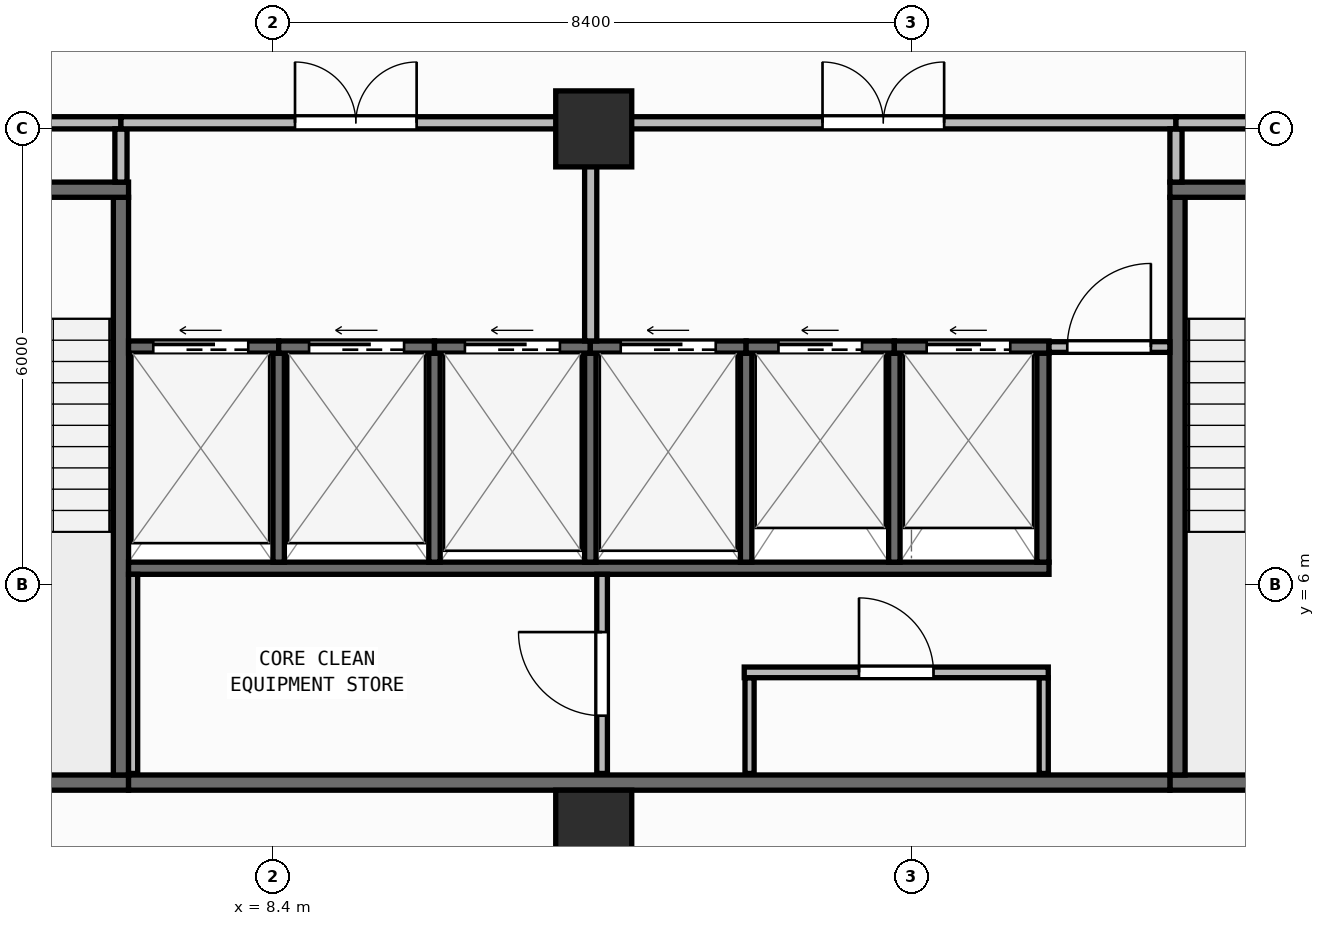
"""IFC4 building model, lengths in metres.
Left out: names, types, materials, properties, quantities, classifications, styles, units other than length and angle.
Written with IfcOpenShell. Run it as: python <this file> out.ifc"""

import sys

from ifc_helpers import new_model, si_unit, direction, frame, frame_2d, origin, origin_2d, place, context, subcontext, project, spatial, rectangle, extrude, element, fill, save


model = new_model("IFC4")
c1 = context("Model", 3, precision=1e-05, world=origin(), true_north=direction((0.0, 1.0)))
c2 = subcontext(c1, "Body", "Model", "MODEL_VIEW")
j1 = project(units=[si_unit("LENGTHUNIT", "METRE"), si_unit("PLANEANGLEUNIT", "RADIAN")], contexts=[c1])
p1 = place(None, origin())
s1 = spatial("IfcSite", under=j1, at=p1, CompositionType="ELEMENT")
p2 = place(p1, origin())
s2 = spatial("IfcBuilding", under=s1, at=p2, CompositionType="ELEMENT")
p3 = place(p2, frame((0.0, 0.0, 200.0)))
s3 = spatial("IfcBuildingStorey", under=s2, at=p3, CompositionType="ELEMENT", Elevation=200.0)
for number, where, z_axis, x_axis in (
    (1, (12.62, 2.8, 0.0), (0.0, 0.0, 1.0), (1.0, 0.0, 0.0)),
    (2, (12.62, 12.0, 0.0), (0.0, 0.0, 1.0), (1.0, 0.0, 0.0)),
):
    element("IfcColumn", number, at=place(p3, frame(where, z_axis=z_axis, x_axis=x_axis)), inside=s3, PredefinedType="COLUMN", context=c2, shape_type="SweptSolid", body=[
        extrude(rectangle(XDim=1.0, YDim=1.0, at=origin_2d()), origin(), (0.0, 0.0, 1.0), 3.95),
    ])
p4 = place(p3, frame((2.66, 0.174, 0.0), z_axis=(0.0, 0.0, 1.0), x_axis=(0.996634028439, 0.081979347142, 0.0)))
e3 = element("IfcWall", 3, at=p4, inside=s3, PredefinedType="STANDARD", context=c2, shape_type="SweptSolid", body=[
    extrude(rectangle(XDim=46.035, YDim=0.26, at=frame_2d((23.018, 0.0))), origin(), (0.0, 0.0, 1.0), 3.71),
])
p5 = place(p4, frame((21.817, 0.0, 0.9)))
e4 = element("IfcOpeningElement", 4, at=p5, cuts=e3, PredefinedType="OPENING", context=c2, shape_type="SweptSolid", body=[
    extrude(rectangle(XDim=2.4, YDim=1.65, at=frame_2d((1.2, 0.825))), frame((0.0, 0.14, 0.0), z_axis=(0.0, -1.0, 0.0), x_axis=(1.0, 0.0, 0.0)), (0.0, 0.0, 1.0), 0.28),
])
p6 = place(p3, frame((2.8, 3.4, 0.0), z_axis=(0.0, 0.0, 1.0), x_axis=(1.0, 0.0, 0.0)))
e5 = element("IfcWall", 5, at=p6, inside=s3, PredefinedType="SHEAR", context=c2, shape_type="SweptSolid", body=[
    extrude(rectangle(XDim=3.7, YDim=0.2, at=frame_2d((1.85, 0.0))), origin(), (0.0, 0.0, 1.0), 3.71),
])
p7 = place(p3, frame((6.4, 3.5, 0.0), z_axis=(0.0, 0.0, 1.0), x_axis=(0.0, 1.0, 0.0)))
e6 = element("IfcWall", 6, at=p7, inside=s3, PredefinedType="SHEAR", context=c2, shape_type="SweptSolid", body=[
    extrude(rectangle(XDim=7.6, YDim=0.2, at=frame_2d((3.8, 0.0))), origin(), (0.0, 0.0, 1.0), 3.71),
])
p8 = place(p3, frame((2.8, 11.2, 0.0), z_axis=(0.0, 0.0, 1.0), x_axis=(1.0, 0.0, 0.0)))
e7 = element("IfcWall", 7, at=p8, inside=s3, PredefinedType="SHEAR", context=c2, shape_type="SweptSolid", body=[
    extrude(rectangle(XDim=3.7, YDim=0.2, at=frame_2d((1.85, 0.0))), origin(), (0.0, 0.0, 1.0), 3.71),
])
p9 = place(p8, frame((1.2, 0.0, 0.0)))
e8 = element("IfcOpeningElement", 8, at=p9, cuts=e7, PredefinedType="OPENING", context=c2, shape_type="SweptSolid", body=[
    extrude(rectangle(XDim=1.3, YDim=2.15, at=frame_2d((0.65, 1.075))), frame((0.0, 0.11, 0.0), z_axis=(0.0, -1.0, 0.0), x_axis=(1.0, 0.0, 0.0)), (0.0, 0.0, 1.0), 0.22),
])
p10 = place(p3, frame((20.2, 3.4, 0.0), z_axis=(0.0, 0.0, 1.0), x_axis=(1.0, 0.0, 0.0)))
e9 = element("IfcWall", 9, at=p10, inside=s3, PredefinedType="SHEAR", context=c2, shape_type="SweptSolid", body=[
    extrude(rectangle(XDim=3.7, YDim=0.2, at=frame_2d((1.85, 0.0))), origin(), (0.0, 0.0, 1.0), 3.71),
])
p11 = place(p3, frame((20.3, 3.5, 0.0), z_axis=(0.0, 0.0, 1.0), x_axis=(0.0, 1.0, 0.0)))
e10 = element("IfcWall", 10, at=p11, inside=s3, PredefinedType="SHEAR", context=c2, shape_type="SweptSolid", body=[
    extrude(rectangle(XDim=7.6, YDim=0.2, at=frame_2d((3.8, 0.0))), origin(), (0.0, 0.0, 1.0), 3.71),
])
p12 = place(p3, frame((20.2, 11.2, 0.0), z_axis=(0.0, 0.0, 1.0), x_axis=(1.0, 0.0, 0.0)))
e11 = element("IfcWall", 11, at=p12, inside=s3, PredefinedType="SHEAR", context=c2, shape_type="SweptSolid", body=[
    extrude(rectangle(XDim=3.7, YDim=0.2, at=frame_2d((1.85, 0.0))), origin(), (0.0, 0.0, 1.0), 3.71),
])
p13 = place(p12, frame((1.2, 0.0, 0.0)))
e12 = element("IfcOpeningElement", 12, at=p13, cuts=e11, PredefinedType="OPENING", context=c2, shape_type="SweptSolid", body=[
    extrude(rectangle(XDim=1.3, YDim=2.15, at=frame_2d((0.65, 1.075))), frame((0.0, 0.11, 0.0), z_axis=(0.0, -1.0, 0.0), x_axis=(1.0, 0.0, 0.0)), (0.0, 0.0, 1.0), 0.22),
])
p14 = place(p3, frame((6.5, 3.4, 0.0), z_axis=(0.0, 0.0, 1.0), x_axis=(1.0, 0.0, 0.0)))
e13 = element("IfcWall", 13, at=p14, inside=s3, PredefinedType="SHEAR", context=c2, shape_type="SweptSolid", body=[
    extrude(rectangle(XDim=13.7, YDim=0.2, at=frame_2d((6.85, 0.0))), origin(), (0.0, 0.0, 1.0), 3.71),
])
p15 = place(p3, frame((6.5, 6.22, 0.0), z_axis=(0.0, 0.0, 1.0), x_axis=(1.0, 0.0, 0.0)))
e14 = element("IfcWall", 14, at=p15, inside=s3, PredefinedType="SHEAR", context=c2, shape_type="SweptSolid", body=[
    extrude(rectangle(XDim=12.11, YDim=0.16, at=frame_2d((6.055, 0.0))), origin(), (0.0, 0.0, 1.0), 3.71),
])
p16 = place(p3, frame((18.53, 6.3, 0.0), z_axis=(0.0, 0.0, 1.0), x_axis=(0.0, 1.0, 0.0)))
e15 = element("IfcWall", 15, at=p16, inside=s3, PredefinedType="SHEAR", context=c2, shape_type="SweptSolid", body=[
    extrude(rectangle(XDim=2.75, YDim=0.16, at=frame_2d((1.375, 0.0))), origin(), (0.0, 0.0, 1.0), 3.71),
])
for number, where, z_axis, x_axis in (
    (16, (8.475, 6.3, 0.0), (0.0, 0.0, 1.0), (0.0, 1.0, 0.0)),
    (17, (10.525, 6.3, 0.0), (0.0, 0.0, 1.0), (0.0, 1.0, 0.0)),
    (18, (12.575, 6.3, 0.0), (0.0, 0.0, 1.0), (0.0, 1.0, 0.0)),
    (19, (14.625, 6.3, 0.0), (0.0, 0.0, 1.0), (0.0, 1.0, 0.0)),
    (20, (16.575, 6.3, 0.0), (0.0, 0.0, 1.0), (0.0, 1.0, 0.0)),
):
    element("IfcWall", number, at=place(p3, frame(where, z_axis=z_axis, x_axis=x_axis)), inside=s3, PredefinedType="SHEAR", context=c2, shape_type="SweptSolid", body=[
        extrude(rectangle(XDim=2.75, YDim=0.15, at=frame_2d((1.375, 0.0))), origin(), (0.0, 0.0, 1.0), 3.71),
    ])
p17 = place(p3, frame((6.5, 9.13, 0.0), z_axis=(0.0, 0.0, 1.0), x_axis=(1.0, 0.0, 0.0)))
e21 = element("IfcWall", 21, at=p17, inside=s3, PredefinedType="SHEAR", context=c2, shape_type="SweptSolid", body=[
    extrude(rectangle(XDim=1.975, YDim=0.16, at=frame_2d((0.988, 0.0))), origin(), (0.0, 0.0, 1.0), 3.71),
])
p18 = place(p17, frame((0.325, 0.0, 0.0)))
e22 = element("IfcOpeningElement", 22, at=p18, cuts=e21, PredefinedType="OPENING", context=c2, shape_type="SweptSolid", body=[
    extrude(rectangle(XDim=1.25, YDim=2.15, at=frame_2d((0.625, 1.075))), frame((0.0, 0.09, 0.0), z_axis=(0.0, -1.0, 0.0), x_axis=(1.0, 0.0, 0.0)), (0.0, 0.0, 1.0), 0.18),
])
p19 = place(p3, frame((8.475, 9.13, 0.0), z_axis=(0.0, 0.0, 1.0), x_axis=(1.0, 0.0, 0.0)))
e23 = element("IfcWall", 23, at=p19, inside=s3, PredefinedType="SHEAR", context=c2, shape_type="SweptSolid", body=[
    extrude(rectangle(XDim=2.05, YDim=0.16, at=frame_2d((1.025, 0.0))), origin(), (0.0, 0.0, 1.0), 3.71),
])
p20 = place(p19, frame((0.4, 0.0, 0.0)))
e24 = element("IfcOpeningElement", 24, at=p20, cuts=e23, PredefinedType="OPENING", context=c2, shape_type="SweptSolid", body=[
    extrude(rectangle(XDim=1.25, YDim=2.15, at=frame_2d((0.625, 1.075))), frame((0.0, 0.09, 0.0), z_axis=(0.0, -1.0, 0.0), x_axis=(1.0, 0.0, 0.0)), (0.0, 0.0, 1.0), 0.18),
])
p21 = place(p3, frame((10.525, 9.13, 0.0), z_axis=(0.0, 0.0, 1.0), x_axis=(1.0, 0.0, 0.0)))
e25 = element("IfcWall", 25, at=p21, inside=s3, PredefinedType="SHEAR", context=c2, shape_type="SweptSolid", body=[
    extrude(rectangle(XDim=2.05, YDim=0.16, at=frame_2d((1.025, 0.0))), origin(), (0.0, 0.0, 1.0), 3.71),
])
p22 = place(p21, frame((0.4, 0.0, 0.0)))
e26 = element("IfcOpeningElement", 26, at=p22, cuts=e25, PredefinedType="OPENING", context=c2, shape_type="SweptSolid", body=[
    extrude(rectangle(XDim=1.25, YDim=2.15, at=frame_2d((0.625, 1.075))), frame((0.0, 0.09, 0.0), z_axis=(0.0, -1.0, 0.0), x_axis=(1.0, 0.0, 0.0)), (0.0, 0.0, 1.0), 0.18),
])
p23 = place(p3, frame((12.575, 9.13, 0.0), z_axis=(0.0, 0.0, 1.0), x_axis=(1.0, 0.0, 0.0)))
e27 = element("IfcWall", 27, at=p23, inside=s3, PredefinedType="SHEAR", context=c2, shape_type="SweptSolid", body=[
    extrude(rectangle(XDim=2.05, YDim=0.16, at=frame_2d((1.025, 0.0))), origin(), (0.0, 0.0, 1.0), 3.71),
])
p24 = place(p23, frame((0.4, 0.0, 0.0)))
e28 = element("IfcOpeningElement", 28, at=p24, cuts=e27, PredefinedType="OPENING", context=c2, shape_type="SweptSolid", body=[
    extrude(rectangle(XDim=1.25, YDim=2.15, at=frame_2d((0.625, 1.075))), frame((0.0, 0.09, 0.0), z_axis=(0.0, -1.0, 0.0), x_axis=(1.0, 0.0, 0.0)), (0.0, 0.0, 1.0), 0.18),
])
p25 = place(p3, frame((14.625, 9.13, 0.0), z_axis=(0.0, 0.0, 1.0), x_axis=(1.0, 0.0, 0.0)))
e29 = element("IfcWall", 29, at=p25, inside=s3, PredefinedType="SHEAR", context=c2, shape_type="SweptSolid", body=[
    extrude(rectangle(XDim=1.95, YDim=0.16, at=frame_2d((0.975, 0.0))), origin(), (0.0, 0.0, 1.0), 3.71),
])
p26 = place(p25, frame((0.425, 0.0, 0.0)))
e30 = element("IfcOpeningElement", 30, at=p26, cuts=e29, PredefinedType="OPENING", context=c2, shape_type="SweptSolid", body=[
    extrude(rectangle(XDim=1.1, YDim=2.15, at=frame_2d((0.55, 1.075))), frame((0.0, 0.09, 0.0), z_axis=(0.0, -1.0, 0.0), x_axis=(1.0, 0.0, 0.0)), (0.0, 0.0, 1.0), 0.18),
])
p27 = place(p3, frame((16.575, 9.13, 0.0), z_axis=(0.0, 0.0, 1.0), x_axis=(1.0, 0.0, 0.0)))
e31 = element("IfcWall", 31, at=p27, inside=s3, PredefinedType="SHEAR", context=c2, shape_type="SweptSolid", body=[
    extrude(rectangle(XDim=2.035, YDim=0.16, at=frame_2d((1.018, 0.0))), origin(), (0.0, 0.0, 1.0), 3.71),
])
p28 = place(p27, frame((0.425, 0.0, 0.0)))
e32 = element("IfcOpeningElement", 32, at=p28, cuts=e31, PredefinedType="OPENING", context=c2, shape_type="SweptSolid", body=[
    extrude(rectangle(XDim=1.1, YDim=2.15, at=frame_2d((0.55, 1.075))), frame((0.0, 0.09, 0.0), z_axis=(0.0, -1.0, 0.0), x_axis=(1.0, 0.0, 0.0)), (0.0, 0.0, 1.0), 0.18),
])
p29 = place(p3, frame((6.56, 3.52, 0.0), z_axis=(0.0, 0.0, 1.0), x_axis=(0.0, 1.0, 0.0)))
e33 = element("IfcWall", 33, at=p29, inside=s3, PredefinedType="PARTITIONING", context=c2, shape_type="SweptSolid", body=[
    extrude(rectangle(XDim=2.62, YDim=0.12, at=frame_2d((1.31, 0.0))), origin(), (0.0, 0.0, 1.0), 3.71),
])
p30 = place(p3, frame((12.73, 3.52, 0.0), z_axis=(0.0, 0.0, 1.0), x_axis=(0.0, 1.0, 0.0)))
e34 = element("IfcWall", 34, at=p30, inside=s3, PredefinedType="PARTITIONING", context=c2, shape_type="SweptSolid", body=[
    extrude(rectangle(XDim=2.62, YDim=0.14, at=frame_2d((1.31, 0.0))), origin(), (0.0, 0.0, 1.0), 3.71),
])
p31 = place(p30, frame((0.76, 0.0, 0.0)))
e35 = element("IfcOpeningElement", 35, at=p31, cuts=e34, PredefinedType="OPENING", context=c2, shape_type="SweptSolid", body=[
    extrude(rectangle(XDim=1.1, YDim=2.1, at=frame_2d((0.55, 1.05))), frame((0.0, 0.08, 0.0), z_axis=(0.0, -1.0, 0.0), x_axis=(1.0, 0.0, 0.0)), (0.0, 0.0, 1.0), 0.16),
])
for number, where, z_axis, x_axis in (
    (36, (14.67, 3.52, 0.0), (0.0, 0.0, 1.0), (0.0, 1.0, 0.0)),
    (37, (18.54, 3.52, 0.0), (0.0, 0.0, 1.0), (0.0, 1.0, 0.0)),
):
    element("IfcWall", number, at=place(p3, frame(where, z_axis=z_axis, x_axis=x_axis)), inside=s3, PredefinedType="PARTITIONING", context=c2, shape_type="SweptSolid", body=[
        extrude(rectangle(XDim=1.26, YDim=0.12, at=frame_2d((0.63, 0.0))), origin(), (0.0, 0.0, 1.0), 3.71),
    ])
p32 = place(p3, frame((14.6, 4.85, 0.0), z_axis=(0.0, 0.0, 1.0), x_axis=(1.0, 0.0, 0.0)))
e38 = element("IfcWall", 38, at=p32, inside=s3, PredefinedType="PARTITIONING", context=c2, shape_type="SweptSolid", body=[
    extrude(rectangle(XDim=4.0, YDim=0.14, at=frame_2d((2.0, 0.0))), origin(), (0.0, 0.0, 1.0), 3.71),
])
p33 = place(p32, frame((1.51, 0.0, 0.0)))
e39 = element("IfcOpeningElement", 39, at=p33, cuts=e38, PredefinedType="OPENING", context=c2, shape_type="SweptSolid", body=[
    extrude(rectangle(XDim=0.98, YDim=2.1, at=frame_2d((0.49, 1.05))), frame((0.0, 0.08, 0.0), z_axis=(0.0, -1.0, 0.0), x_axis=(1.0, 0.0, 0.0)), (0.0, 0.0, 1.0), 0.16),
])
p34 = place(p3, frame((18.61, 9.13, 0.0), z_axis=(0.0, 0.0, 1.0), x_axis=(1.0, 0.0, 0.0)))
e40 = element("IfcWall", 40, at=p34, inside=s3, PredefinedType="PARTITIONING", context=c2, shape_type="SweptSolid", body=[
    extrude(rectangle(XDim=1.59, YDim=0.14, at=frame_2d((0.795, 0.0))), origin(), (0.0, 0.0, 1.0), 3.71),
])
p35 = place(p34, frame((0.24, 0.0, 0.0)))
e41 = element("IfcOpeningElement", 41, at=p35, cuts=e40, PredefinedType="OPENING", context=c2, shape_type="SweptSolid", body=[
    extrude(rectangle(XDim=1.1, YDim=2.1, at=frame_2d((0.55, 1.05))), frame((0.0, 0.08, 0.0), z_axis=(0.0, -1.0, 0.0), x_axis=(1.0, 0.0, 0.0)), (0.0, 0.0, 1.0), 0.16),
])
p36 = place(p3, frame((2.8, 12.08, 0.0), z_axis=(0.0, 0.0, 1.0), x_axis=(1.0, 0.0, 0.0)))
e42 = element("IfcWall", 42, at=p36, inside=s3, PredefinedType="PARTITIONING", context=c2, shape_type="SweptSolid", body=[
    extrude(rectangle(XDim=3.6, YDim=0.16, at=frame_2d((1.8, 0.0))), origin(), (0.0, 0.0, 1.0), 3.152),
])
p37 = place(p36, frame((1.0, 0.0, 0.0)))
e43 = element("IfcOpeningElement", 43, at=p37, cuts=e42, PredefinedType="OPENING", context=c2, shape_type="SweptSolid", body=[
    extrude(rectangle(XDim=1.6, YDim=2.05, at=frame_2d((0.8, 1.025))), frame((0.0, 0.09, 0.0), z_axis=(0.0, -1.0, 0.0), x_axis=(1.0, 0.0, 0.0)), (0.0, 0.0, 1.0), 0.18),
])
p38 = place(p3, frame((6.4, 11.3, 0.0), z_axis=(0.0, 0.0, 1.0), x_axis=(0.0, 1.0, 0.0)))
e44 = element("IfcWall", 44, at=p38, inside=s3, PredefinedType="PARTITIONING", context=c2, shape_type="SweptSolid", body=[
    extrude(rectangle(XDim=0.7, YDim=0.16, at=frame_2d((0.35, 0.0))), origin(), (0.0, 0.0, 1.0), 3.71),
])
p39 = place(p3, frame((6.4, 12.08, 0.0), z_axis=(0.0, 0.0, 1.0), x_axis=(1.0, 0.0, 0.0)))
e45 = element("IfcWall", 45, at=p39, inside=s3, PredefinedType="PARTITIONING", context=c2, shape_type="SweptSolid", body=[
    extrude(rectangle(XDim=6.18, YDim=0.16, at=frame_2d((3.09, 0.0))), origin(), (0.0, 0.0, 1.0), 3.152),
])
p40 = place(p39, frame((2.29, 0.0, 0.0)))
e46 = element("IfcOpeningElement", 46, at=p40, cuts=e45, PredefinedType="OPENING", context=c2, shape_type="SweptSolid", body=[
    extrude(rectangle(XDim=1.6, YDim=2.05, at=frame_2d((0.8, 1.025))), frame((0.0, 0.09, 0.0), z_axis=(0.0, -1.0, 0.0), x_axis=(1.0, 0.0, 0.0)), (0.0, 0.0, 1.0), 0.18),
])
p41 = place(p3, frame((12.58, 9.21, 0.0), z_axis=(0.0, 0.0, 1.0), x_axis=(0.0, 1.0, 0.0)))
e47 = element("IfcWall", 47, at=p41, inside=s3, PredefinedType="PARTITIONING", context=c2, shape_type="SweptSolid", body=[
    extrude(rectangle(XDim=2.79, YDim=0.16, at=frame_2d((1.395, 0.0))), origin(), (0.0, 0.0, 1.0), 3.71),
])
p42 = place(p3, frame((12.58, 12.08, 0.0), z_axis=(0.0, 0.0, 1.0), x_axis=(1.0, 0.0, 0.0)))
e48 = element("IfcWall", 48, at=p42, inside=s3, PredefinedType="PARTITIONING", context=c2, shape_type="SweptSolid", body=[
    extrude(rectangle(XDim=7.7, YDim=0.16, at=frame_2d((3.85, 0.0))), origin(), (0.0, 0.0, 1.0), 3.152),
])
p43 = place(p42, frame((3.05, 0.0, 0.0)))
e49 = element("IfcOpeningElement", 49, at=p43, cuts=e48, PredefinedType="OPENING", context=c2, shape_type="SweptSolid", body=[
    extrude(rectangle(XDim=1.6, YDim=2.05, at=frame_2d((0.8, 1.025))), frame((0.0, 0.09, 0.0), z_axis=(0.0, -1.0, 0.0), x_axis=(1.0, 0.0, 0.0)), (0.0, 0.0, 1.0), 0.18),
])
p44 = place(p3, frame((20.28, 11.3, 0.0), z_axis=(0.0, 0.0, 1.0), x_axis=(0.0, 1.0, 0.0)))
e50 = element("IfcWall", 50, at=p44, inside=s3, PredefinedType="PARTITIONING", context=c2, shape_type="SweptSolid", body=[
    extrude(rectangle(XDim=0.7, YDim=0.16, at=frame_2d((0.35, 0.0))), origin(), (0.0, 0.0, 1.0), 3.71),
])
p45 = place(p3, frame((20.28, 12.08, 0.0), z_axis=(0.0, 0.0, 1.0), x_axis=(1.0, 0.0, 0.0)))
e51 = element("IfcWall", 51, at=p45, inside=s3, PredefinedType="PARTITIONING", context=c2, shape_type="SweptSolid", body=[
    extrude(rectangle(XDim=3.62, YDim=0.16, at=frame_2d((1.81, 0.0))), origin(), (0.0, 0.0, 1.0), 3.152),
])
p46 = place(p45, frame((1.01, 0.0, 0.0)))
e52 = element("IfcOpeningElement", 52, at=p46, cuts=e51, PredefinedType="OPENING", context=c2, shape_type="SweptSolid", body=[
    extrude(rectangle(XDim=1.6, YDim=2.05, at=frame_2d((0.8, 1.025))), frame((0.0, 0.09, 0.0), z_axis=(0.0, -1.0, 0.0), x_axis=(1.0, 0.0, 0.0)), (0.0, 0.0, 1.0), 0.18),
])
p47 = place(p18, origin())
e53 = element("IfcDoor", 53, at=p47, inside=s3, OperationType="SLIDING_TO_LEFT", PredefinedType="DOOR", context=c2, shape_type="SweptSolid", body=[
    extrude(rectangle(XDim=1.25, YDim=2.15, at=frame_2d((0.625, 1.075))), frame((0.0, 0.025, 0.0), z_axis=(0.0, -1.0, 0.0), x_axis=(1.0, 0.0, 0.0)), (0.0, 0.0, 1.0), 0.05),
])
fill(e22, e53)
p48 = place(p20, origin())
e54 = element("IfcDoor", 54, at=p48, inside=s3, OperationType="SLIDING_TO_LEFT", PredefinedType="DOOR", context=c2, shape_type="SweptSolid", body=[
    extrude(rectangle(XDim=1.25, YDim=2.15, at=frame_2d((0.625, 1.075))), frame((0.0, 0.025, 0.0), z_axis=(0.0, -1.0, 0.0), x_axis=(1.0, 0.0, 0.0)), (0.0, 0.0, 1.0), 0.05),
])
fill(e24, e54)
p49 = place(p22, origin())
e55 = element("IfcDoor", 55, at=p49, inside=s3, OperationType="SLIDING_TO_LEFT", PredefinedType="DOOR", context=c2, shape_type="SweptSolid", body=[
    extrude(rectangle(XDim=1.25, YDim=2.15, at=frame_2d((0.625, 1.075))), frame((0.0, 0.025, 0.0), z_axis=(0.0, -1.0, 0.0), x_axis=(1.0, 0.0, 0.0)), (0.0, 0.0, 1.0), 0.05),
])
fill(e26, e55)
p50 = place(p24, origin())
e56 = element("IfcDoor", 56, at=p50, inside=s3, OperationType="SLIDING_TO_LEFT", PredefinedType="DOOR", context=c2, shape_type="SweptSolid", body=[
    extrude(rectangle(XDim=1.25, YDim=2.15, at=frame_2d((0.625, 1.075))), frame((0.0, 0.025, 0.0), z_axis=(0.0, -1.0, 0.0), x_axis=(1.0, 0.0, 0.0)), (0.0, 0.0, 1.0), 0.05),
])
fill(e28, e56)
p51 = place(p26, origin())
e57 = element("IfcDoor", 57, at=p51, inside=s3, OperationType="SLIDING_TO_LEFT", PredefinedType="DOOR", context=c2, shape_type="SweptSolid", body=[
    extrude(rectangle(XDim=1.1, YDim=2.15, at=frame_2d((0.55, 1.075))), frame((0.0, 0.025, 0.0), z_axis=(0.0, -1.0, 0.0), x_axis=(1.0, 0.0, 0.0)), (0.0, 0.0, 1.0), 0.05),
])
fill(e30, e57)
p52 = place(p28, origin())
e58 = element("IfcDoor", 58, at=p52, inside=s3, OperationType="SLIDING_TO_LEFT", PredefinedType="DOOR", context=c2, shape_type="SweptSolid", body=[
    extrude(rectangle(XDim=1.1, YDim=2.15, at=frame_2d((0.55, 1.075))), frame((0.0, 0.025, 0.0), z_axis=(0.0, -1.0, 0.0), x_axis=(1.0, 0.0, 0.0)), (0.0, 0.0, 1.0), 0.05),
])
fill(e32, e58)
p53 = place(p31, origin())
e59 = element("IfcDoor", 59, at=p53, inside=s3, OperationType="SINGLE_SWING_RIGHT", PredefinedType="DOOR", context=c2, shape_type="SweptSolid", body=[
    extrude(rectangle(XDim=1.1, YDim=2.1, at=frame_2d((0.55, 1.05))), frame((0.0, 0.025, 0.0), z_axis=(0.0, -1.0, 0.0), x_axis=(1.0, 0.0, 0.0)), (0.0, 0.0, 1.0), 0.05),
])
fill(e35, e59)
p54 = place(p33, origin())
e60 = element("IfcDoor", 60, at=p54, inside=s3, OperationType="SINGLE_SWING_LEFT", PredefinedType="DOOR", context=c2, shape_type="SweptSolid", body=[
    extrude(rectangle(XDim=0.98, YDim=2.1, at=frame_2d((0.49, 1.05))), frame((0.0, 0.025, 0.0), z_axis=(0.0, -1.0, 0.0), x_axis=(1.0, 0.0, 0.0)), (0.0, 0.0, 1.0), 0.05),
])
fill(e39, e60)
p55 = place(p35, origin())
e61 = element("IfcDoor", 61, at=p55, inside=s3, OperationType="SINGLE_SWING_RIGHT", PredefinedType="DOOR", context=c2, shape_type="SweptSolid", body=[
    extrude(rectangle(XDim=1.1, YDim=2.1, at=frame_2d((0.55, 1.05))), frame((0.0, 0.025, 0.0), z_axis=(0.0, -1.0, 0.0), x_axis=(1.0, 0.0, 0.0)), (0.0, 0.0, 1.0), 0.05),
])
fill(e41, e61)
p56 = place(p40, origin())
e62 = element("IfcDoor", 62, at=p56, inside=s3, OperationType="DOUBLE_DOOR_SINGLE_SWING", PredefinedType="DOOR", context=c2, shape_type="SweptSolid", body=[
    extrude(rectangle(XDim=1.6, YDim=2.05, at=frame_2d((0.8, 1.025))), frame((0.0, 0.025, 0.0), z_axis=(0.0, -1.0, 0.0), x_axis=(1.0, 0.0, 0.0)), (0.0, 0.0, 1.0), 0.05),
])
fill(e46, e62)
p57 = place(p43, origin())
e63 = element("IfcDoor", 63, at=p57, inside=s3, OperationType="DOUBLE_DOOR_SINGLE_SWING", PredefinedType="DOOR", context=c2, shape_type="SweptSolid", body=[
    extrude(rectangle(XDim=1.6, YDim=2.05, at=frame_2d((0.8, 1.025))), frame((0.0, 0.025, 0.0), z_axis=(0.0, -1.0, 0.0), x_axis=(1.0, 0.0, 0.0)), (0.0, 0.0, 1.0), 0.05),
])
fill(e49, e63)
save(model, sys.argv[1])
